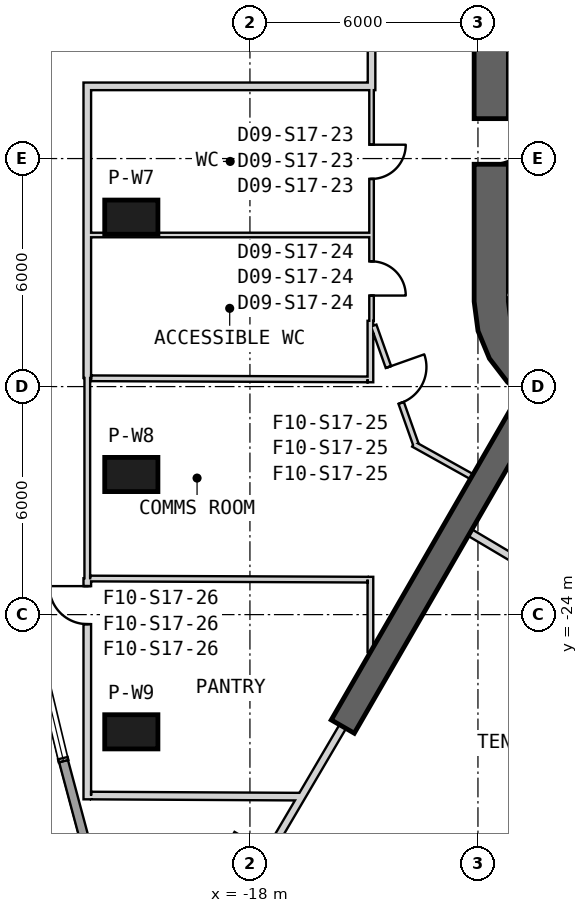
"""IFC4 building model, lengths in metres.
Left out: names, types, materials, properties, quantities, classifications, styles, units other than length and angle.
Written with IfcOpenShell. Run it as: python <this file> out.ifc"""

import sys

from ifc_helpers import new_model, si_unit, direction, frame, frame_2d, origin, origin_2d, place, context, subcontext, project, spatial, polyline, rectangle, outline, extrude, element, fill, save


model = new_model("IFC4")
c1 = context("Model", 3, precision=1e-05, world=origin(), true_north=direction((0.0, 1.0)))
c2 = subcontext(c1, "Body", "Model", "MODEL_VIEW")
j1 = project(units=[si_unit("LENGTHUNIT", "METRE"), si_unit("PLANEANGLEUNIT", "RADIAN")], contexts=[c1])
p1 = place(None, origin())
s1 = spatial("IfcSite", under=j1, at=p1, CompositionType="ELEMENT")
p2 = place(p1, origin())
s2 = spatial("IfcBuilding", under=s1, at=p2, CompositionType="ELEMENT")
p3 = place(p2, frame((0.0, 0.0, 265.2)))
s3 = spatial("IfcBuildingStorey", under=s2, at=p3, CompositionType="ELEMENT", Elevation=265.2)
p4 = place(p3, frame((-18.135, -31.411, 0.0), z_axis=(0.0, 0.0, 1.0), x_axis=(-0.5, -0.866025403784, 0.0)))
e1 = element("IfcColumn", 1, at=p4, inside=s3, PredefinedType="COLUMN", context=c2, shape_type="SweptSolid", body=[
    extrude(rectangle(XDim=2.6, YDim=2.1, at=origin_2d()), origin(), (0.0, 0.0, 1.0), 4.0),
])
for number, where, z_axis, x_axis in (
    (2, (-21.121, -13.542, 0.0), (0.0, 0.0, 1.0), (-1.0, 0.0, 0.0)),
    (3, (-21.121, -20.313, 0.0), (0.0, 0.0, 1.0), (-1.0, 0.0, 0.0)),
    (4, (-21.121, -27.084, 0.0), (0.0, 0.0, 1.0), (-1.0, 0.0, 0.0)),
):
    element("IfcColumn", number, at=place(p3, frame(where, z_axis=z_axis, x_axis=x_axis)), inside=s3, PredefinedType="COLUMN", context=c2, shape_type="SweptSolid", body=[
        extrude(rectangle(XDim=1.4, YDim=0.9, at=origin_2d()), origin(), (0.0, 0.0, 1.0), 4.0),
    ])
p5 = place(p3, frame((-11.65, 15.762, 0.0), z_axis=(0.0, 0.0, 1.0), x_axis=(0.0, -1.0, 0.0)))
e5 = element("IfcWall", 5, at=p5, inside=s3, PredefinedType="SHEAR", context=c2, shape_type="SweptSolid", body=[
    extrude(rectangle(XDim=31.523, YDim=0.9, at=frame_2d((15.762, 0.0))), origin(), (0.0, 0.0, 1.0), 4.0),
])
p6 = place(p5, frame((7.062, 0.0, 0.0)))
e6 = element("IfcOpeningElement", 6, at=p6, cuts=e5, PredefinedType="OPENING", context=c2, shape_type="SweptSolid", body=[
    extrude(rectangle(XDim=1.2, YDim=2.4, at=frame_2d((0.6, 1.2))), frame((0.0, 0.46, 0.0), z_axis=(0.0, -1.0, 0.0), x_axis=(1.0, 0.0, 0.0)), (0.0, 0.0, 1.0), 0.92),
])
p7 = place(p5, frame((9.762, 0.0, 0.0)))
e7 = element("IfcOpeningElement", 7, at=p7, cuts=e5, PredefinedType="OPENING", context=c2, shape_type="SweptSolid", body=[
    extrude(rectangle(XDim=1.2, YDim=2.4, at=frame_2d((0.6, 1.2))), frame((0.0, 0.46, 0.0), z_axis=(0.0, -1.0, 0.0), x_axis=(1.0, 0.0, 0.0)), (0.0, 0.0, 1.0), 0.92),
])
p8 = place(p5, frame((12.462, 0.0, 0.0)))
e8 = element("IfcOpeningElement", 8, at=p8, cuts=e5, PredefinedType="OPENING", context=c2, shape_type="SweptSolid", body=[
    extrude(rectangle(XDim=1.2, YDim=2.4, at=frame_2d((0.6, 1.2))), frame((0.0, 0.46, 0.0), z_axis=(0.0, -1.0, 0.0), x_axis=(1.0, 0.0, 0.0)), (0.0, 0.0, 1.0), 0.92),
])
p9 = place(p5, frame((15.162, 0.0, 0.0)))
e9 = element("IfcOpeningElement", 9, at=p9, cuts=e5, PredefinedType="OPENING", context=c2, shape_type="SweptSolid", body=[
    extrude(rectangle(XDim=1.2, YDim=2.4, at=frame_2d((0.6, 1.2))), frame((0.0, 0.46, 0.0), z_axis=(0.0, -1.0, 0.0), x_axis=(1.0, 0.0, 0.0)), (0.0, 0.0, 1.0), 0.92),
])
p10 = place(p5, frame((17.862, 0.0, 0.0)))
e10 = element("IfcOpeningElement", 10, at=p10, cuts=e5, PredefinedType="OPENING", context=c2, shape_type="SweptSolid", body=[
    extrude(rectangle(XDim=1.2, YDim=2.4, at=frame_2d((0.6, 1.2))), frame((0.0, 0.46, 0.0), z_axis=(0.0, -1.0, 0.0), x_axis=(1.0, 0.0, 0.0)), (0.0, 0.0, 1.0), 0.92),
])
p11 = place(p5, frame((20.562, 0.0, 0.0)))
e11 = element("IfcOpeningElement", 11, at=p11, cuts=e5, PredefinedType="OPENING", context=c2, shape_type="SweptSolid", body=[
    extrude(rectangle(XDim=1.2, YDim=2.4, at=frame_2d((0.6, 1.2))), frame((0.0, 0.46, 0.0), z_axis=(0.0, -1.0, 0.0), x_axis=(1.0, 0.0, 0.0)), (0.0, 0.0, 1.0), 0.92),
])
p12 = place(p5, frame((23.262, 0.0, 0.0)))
e12 = element("IfcOpeningElement", 12, at=p12, cuts=e5, PredefinedType="OPENING", context=c2, shape_type="SweptSolid", body=[
    extrude(rectangle(XDim=1.2, YDim=2.4, at=frame_2d((0.6, 1.2))), frame((0.0, 0.46, 0.0), z_axis=(0.0, -1.0, 0.0), x_axis=(1.0, 0.0, 0.0)), (0.0, 0.0, 1.0), 0.92),
])
p13 = place(p5, frame((3.612, 0.0, 0.0)))
e13 = element("IfcOpeningElement", 13, at=p13, cuts=e5, PredefinedType="OPENING", context=c2, shape_type="SweptSolid", body=[
    extrude(rectangle(XDim=1.2, YDim=2.4, at=frame_2d((0.6, 1.2))), frame((0.0, 0.46, 0.0), z_axis=(0.0, -1.0, 0.0), x_axis=(1.0, 0.0, 0.0)), (0.0, 0.0, 1.0), 0.92),
])
p14 = place(p5, frame((26.712, 0.0, 0.0)))
e14 = element("IfcOpeningElement", 14, at=p14, cuts=e5, PredefinedType="OPENING", context=c2, shape_type="SweptSolid", body=[
    extrude(rectangle(XDim=1.2, YDim=2.4, at=frame_2d((0.6, 1.2))), frame((0.0, 0.46, 0.0), z_axis=(0.0, -1.0, 0.0), x_axis=(1.0, 0.0, 0.0)), (0.0, 0.0, 1.0), 0.92),
])
p15 = place(p3, origin())
e15 = element("IfcWall", 15, at=p15, inside=s3, PredefinedType="SHEAR", context=c2, shape_type="SweptSolid", body=[
    extrude(outline(polyline([(-12.1, -15.762), (-11.998, -16.538), (-11.698, -17.262), (-11.221, -17.883), (-10.6, -18.36), (-9.876, -18.659), (-9.1, -18.762), (-8.323, -18.659), (-7.6, -18.36), (-8.05, -17.58), (-8.556, -17.79), (-9.1, -17.862), (-9.644, -17.79), (-10.15, -17.58), (-10.585, -17.247), (-10.919, -16.812), (-11.128, -16.305), (-11.2, -15.762), (-12.1, -15.762)])), origin(), (0.0, 0.0, 1.0), 4.0),
])
p16 = place(p3, frame((-10.575, -18.316, 0.0), z_axis=(0.0, 0.0, 1.0), x_axis=(-0.500007350791, -0.866021159762, 0.0)))
e16 = element("IfcWall", 16, at=p16, inside=s3, PredefinedType="SHEAR", context=c2, shape_type="SweptSolid", body=[
    extrude(rectangle(XDim=9.965, YDim=0.7, at=frame_2d((4.982, 0.0))), origin(), (0.0, 0.0, 1.0), 4.0),
])
p17 = place(p3, frame((-22.905, -27.854, 0.0), z_axis=(0.0, 0.0, 1.0), x_axis=(0.258814010312, -0.965927175343, 0.0)))
e17 = element("IfcWall", 17, at=p17, inside=s3, PredefinedType="SOLIDWALL", context=c2, shape_type="SweptSolid", body=[
    extrude(rectangle(XDim=3.55, YDim=0.24, at=frame_2d((1.775, 0.0))), origin(), (0.0, 0.0, 1.0), 3.7),
])
p18 = place(p3, frame((-11.282, -15.541, -0.3), z_axis=(0.0, 0.0, 1.0), x_axis=(0.866000483506, -0.500043160704, 0.0)))
e18 = element("IfcWall", 18, at=p18, inside=s3, PredefinedType="SHEAR", context=c2, shape_type="SweptSolid", body=[
    extrude(rectangle(XDim=3.8, YDim=0.2, at=frame_2d((1.9, 0.0))), origin(), (0.0, 0.0, 1.0), 4.0),
])
p19 = place(p3, frame((-7.196, -8.663, -0.3), z_axis=(0.0, 0.0, 1.0), x_axis=(-0.499997992926, -0.866026562566, 0.0)))
e19 = element("IfcWall", 19, at=p19, inside=s3, PredefinedType="SHEAR", context=c2, shape_type="SweptSolid", body=[
    extrude(rectangle(XDim=7.9, YDim=0.2, at=frame_2d((3.95, 0.0))), origin(), (0.0, 0.0, 1.0), 4.0),
])
p20 = place(p3, frame((-14.8, -10.13, 0.0), z_axis=(0.0, 0.0, 1.0), x_axis=(0.0, -1.0, 0.0)))
e20 = element("IfcWall", 20, at=p20, inside=s3, PredefinedType="PARTITIONING", context=c2, shape_type="SweptSolid", body=[
    extrude(rectangle(XDim=6.138, YDim=0.12, at=frame_2d((3.069, 0.0))), origin(), (0.0, 0.0, 1.0), 2.98),
])
p21 = place(p20, frame((1.506, 0.0, 0.0)))
e21 = element("IfcOpeningElement", 21, at=p21, cuts=e20, PredefinedType="OPENING", context=c2, shape_type="SweptSolid", body=[
    extrude(rectangle(XDim=0.9, YDim=2.1, at=frame_2d((0.45, 1.05))), frame((0.0, 0.07, 0.0), z_axis=(0.0, -1.0, 0.0), x_axis=(1.0, 0.0, 0.0)), (0.0, 0.0, 1.0), 0.14),
])
p22 = place(p20, frame((4.575, 0.0, 0.0)))
e22 = element("IfcOpeningElement", 22, at=p22, cuts=e20, PredefinedType="OPENING", context=c2, shape_type="SweptSolid", body=[
    extrude(rectangle(XDim=0.9, YDim=2.1, at=frame_2d((0.45, 1.05))), frame((0.0, 0.07, 0.0), z_axis=(0.0, -1.0, 0.0), x_axis=(1.0, 0.0, 0.0)), (0.0, 0.0, 1.0), 0.14),
])
p23 = place(p3, frame((-14.8, -0.07, 0.0), z_axis=(0.0, 0.0, 1.0), x_axis=(0.0, -1.0, 0.0)))
e23 = element("IfcWall", 23, at=p23, inside=s3, PredefinedType="PARTITIONING", context=c2, shape_type="SweptSolid", body=[
    extrude(rectangle(XDim=10.13, YDim=0.2, at=frame_2d((5.065, 0.0))), origin(), (0.0, 0.0, 1.0), 3.07),
])
p24 = place(p3, frame((-13.696, -19.514, 0.0), z_axis=(0.0, 0.0, 1.0), x_axis=(0.873335409284, -0.487119351792, 0.0)))
e24 = element("IfcWall", 24, at=p24, inside=s3, PredefinedType="PLUMBINGWALL", context=c2, shape_type="SweptSolid", body=[
    extrude(rectangle(XDim=1.754, YDim=0.15, at=frame_2d((0.877, 0.0))), origin(), (0.0, 0.0, 1.0), 3.7),
])
p25 = place(p3, frame((-14.743, -16.394, 0.0), z_axis=(0.0, 0.0, 1.0), x_axis=(0.334298080075, -0.942467396602, 0.0)))
e25 = element("IfcWall", 25, at=p25, inside=s3, PredefinedType="PLUMBINGWALL", context=c2, shape_type="SweptSolid", body=[
    extrude(rectangle(XDim=3.317, YDim=0.15, at=frame_2d((1.659, 0.0))), origin(), (0.0, 0.0, 1.0), 2.88),
])
p26 = place(p25, frame((1.158, 0.0, 0.0)))
e26 = element("IfcOpeningElement", 26, at=p26, cuts=e25, PredefinedType="OPENING", context=c2, shape_type="SweptSolid", body=[
    extrude(rectangle(XDim=1.0, YDim=2.1, at=frame_2d((0.5, 1.05))), frame((0.0, 0.085, 0.0), z_axis=(0.0, -1.0, 0.0), x_axis=(1.0, 0.0, 0.0)), (0.0, 0.0, 1.0), 0.17),
])
p27 = place(p3, frame((-12.207, -21.843, 0.0), z_axis=(0.0, 0.0, 1.0), x_axis=(0.859912345357, -0.510441728606, 0.0)))
e27 = element("IfcWall", 27, at=p27, inside=s3, PredefinedType="PARTITIONING", context=c2, shape_type="SweptSolid", body=[
    extrude(rectangle(XDim=2.093, YDim=0.2, at=frame_2d((1.046, 0.0))), origin(), (0.0, 0.0, 1.0), 3.7),
])
p28 = place(p3, frame((-15.557, -26.946, 0.0), z_axis=(0.0, 0.0, 1.0), x_axis=(-0.506699088554, -0.862122980588, 0.0)))
e28 = element("IfcWall", 28, at=p28, inside=s3, PredefinedType="PARTITIONING", context=c2, shape_type="SweptSolid", body=[
    extrude(rectangle(XDim=3.855, YDim=0.2, at=frame_2d((1.928, 0.0))), origin(), (0.0, 0.0, 1.0), 3.27),
])
p29 = place(p3, frame((-14.9, -10.1, 0.0), z_axis=(0.0, 0.0, 1.0), x_axis=(-1.0, 0.0, 0.0)))
e29 = element("IfcWall", 29, at=p29, inside=s3, PredefinedType="PARTITIONING", context=c2, shape_type="SweptSolid", body=[
    extrude(rectangle(XDim=7.48, YDim=0.2, at=frame_2d((3.74, 0.0))), origin(), (0.0, 0.0, 1.0), 3.07),
])
p30 = place(p3, frame((-22.28, -28.86, 0.0), z_axis=(0.0, 0.0, 1.0), x_axis=(0.0, 1.0, 0.0)))
e30 = element("IfcWall", 30, at=p30, inside=s3, PredefinedType="PARTITIONING", context=c2, shape_type="SweptSolid", body=[
    extrude(rectangle(XDim=5.817, YDim=0.2, at=frame_2d((2.909, 0.0))), origin(), (0.0, 0.0, 1.0), 3.7),
])
p31 = place(p30, frame((4.61, 0.0, 0.0)))
e31 = element("IfcOpeningElement", 31, at=p31, cuts=e30, PredefinedType="OPENING", context=c2, shape_type="SweptSolid", body=[
    extrude(rectangle(XDim=1.0, YDim=2.1, at=frame_2d((0.5, 1.05))), frame((0.0, 0.11, 0.0), z_axis=(0.0, -1.0, 0.0), x_axis=(1.0, 0.0, 0.0)), (0.0, 0.0, 1.0), 0.22),
])
p32 = place(p3, frame((-22.28, -17.774, 0.0), z_axis=(0.0, 0.0, 1.0), x_axis=(0.0, 1.0, 0.0)))
e32 = element("IfcWall", 32, at=p32, inside=s3, PredefinedType="PARTITIONING", context=c2, shape_type="SweptSolid", body=[
    extrude(rectangle(XDim=7.574, YDim=0.2, at=frame_2d((3.787, 0.0))), origin(), (0.0, 0.0, 1.0), 3.7),
])
p33 = place(p3, frame((-22.28, -23.043, 0.0), z_axis=(0.0, 0.0, 1.0), x_axis=(0.0, 1.0, 0.0)))
e33 = element("IfcWall", 33, at=p33, inside=s3, PredefinedType="PLUMBINGWALL", context=c2, shape_type="SweptSolid", body=[
    extrude(rectangle(XDim=5.269, YDim=0.15, at=frame_2d((2.634, 0.0))), origin(), (0.0, 0.0, 1.0), 3.7),
])
p34 = place(p3, frame((-22.18, -28.76, 0.0), z_axis=(0.0, 0.0, 1.0), x_axis=(0.999985875988, -0.005314868268, 0.0)))
e34 = element("IfcWall", 34, at=p34, inside=s3, PredefinedType="PARTITIONING", context=c2, shape_type="SweptSolid", body=[
    extrude(rectangle(XDim=5.558, YDim=0.2, at=frame_2d((2.779, 0.0))), origin(), (0.0, 0.0, 1.0), 3.27),
])
p35 = place(p3, frame((-22.18, -14.011, 0.0), z_axis=(0.0, 0.0, 1.0), x_axis=(1.0, 0.0, 0.0)))
e35 = element("IfcWall", 35, at=p35, inside=s3, PredefinedType="PARTITIONING", context=c2, shape_type="SweptSolid", body=[
    extrude(rectangle(XDim=7.35, YDim=0.12, at=frame_2d((3.675, 0.0))), origin(), (0.0, 0.0, 1.0), 3.7),
])
p36 = place(p3, frame((-14.83, -24.986, 0.0), z_axis=(0.0, 0.0, 1.0), x_axis=(0.0, 1.0, 0.0)))
e36 = element("IfcWall", 36, at=p36, inside=s3, PredefinedType="PLUMBINGWALL", context=c2, shape_type="SweptSolid", body=[
    extrude(rectangle(XDim=1.981, YDim=0.15, at=frame_2d((0.991, 0.0))), origin(), (0.0, 0.0, 1.0), 3.7),
])
p37 = place(p3, frame((-14.83, -17.886, 0.0), z_axis=(0.0, 0.0, 1.0), x_axis=(0.0, 1.0, 0.0)))
e37 = element("IfcWall", 37, at=p37, inside=s3, PredefinedType="PLUMBINGWALL", context=c2, shape_type="SweptSolid", body=[
    extrude(rectangle(XDim=1.618, YDim=0.15, at=frame_2d((0.809, 0.0))), origin(), (0.0, 0.0, 1.0), 3.7),
])
p38 = place(p3, frame((-14.905, -17.811, 0.0), z_axis=(0.0, 0.0, 1.0), x_axis=(-0.999991891267, 0.004027083259, 0.0)))
e38 = element("IfcWall", 38, at=p38, inside=s3, PredefinedType="PLUMBINGWALL", context=c2, shape_type="SweptSolid", body=[
    extrude(rectangle(XDim=7.275, YDim=0.15, at=frame_2d((3.637, 0.0))), origin(), (0.0, 0.0, 1.0), 2.98),
])
p39 = place(p3, frame((-22.205, -23.051, 0.0), z_axis=(0.0, 0.0, 1.0), x_axis=(0.999991947035, -0.004013211386, 0.0)))
e39 = element("IfcWall", 39, at=p39, inside=s3, PredefinedType="PLUMBINGWALL", context=c2, shape_type="SweptSolid", body=[
    extrude(rectangle(XDim=7.3, YDim=0.15, at=frame_2d((3.65, 0.0))), origin(), (0.0, 0.0, 1.0), 2.88),
])
p40 = place(p21, origin())
e40 = element("IfcDoor", 40, at=p40, inside=s3, OperationType="SINGLE_SWING_RIGHT", PredefinedType="NOTDEFINED", context=c2, shape_type="SweptSolid", body=[
    extrude(rectangle(XDim=0.9, YDim=2.1, at=frame_2d((0.45, 1.05))), frame((0.0, 0.025, 0.0), z_axis=(0.0, -1.0, 0.0), x_axis=(1.0, 0.0, 0.0)), (0.0, 0.0, 1.0), 0.05),
])
fill(e21, e40)
p41 = place(p22, origin())
e41 = element("IfcDoor", 41, at=p41, inside=s3, OperationType="SINGLE_SWING_RIGHT", PredefinedType="NOTDEFINED", context=c2, shape_type="SweptSolid", body=[
    extrude(rectangle(XDim=0.9, YDim=2.1, at=frame_2d((0.45, 1.05))), frame((0.0, 0.025, 0.0), z_axis=(0.0, -1.0, 0.0), x_axis=(1.0, 0.0, 0.0)), (0.0, 0.0, 1.0), 0.05),
])
fill(e22, e41)
p42 = place(p26, origin())
e42 = element("IfcDoor", 42, at=p42, inside=s3, OperationType="SINGLE_SWING_LEFT", PredefinedType="USERDEFINED", context=c2, shape_type="SweptSolid", body=[
    extrude(rectangle(XDim=1.0, YDim=2.1, at=frame_2d((0.5, 1.05))), frame((0.0, 0.025, 0.0), z_axis=(0.0, -1.0, 0.0), x_axis=(1.0, 0.0, 0.0)), (0.0, 0.0, 1.0), 0.05),
])
fill(e26, e42)
p43 = place(p31, origin())
e43 = element("IfcDoor", 43, at=p43, inside=s3, OperationType="SINGLE_SWING_RIGHT", PredefinedType="USERDEFINED", context=c2, shape_type="SweptSolid", body=[
    extrude(rectangle(XDim=1.0, YDim=2.1, at=frame_2d((0.5, 1.05))), frame((0.0, 0.025, 0.0), z_axis=(0.0, -1.0, 0.0), x_axis=(1.0, 0.0, 0.0)), (0.0, 0.0, 1.0), 0.05),
])
fill(e31, e43)
p44 = place(p14, origin())
e44 = element("IfcDoor", 44, at=p44, inside=s3, OperationType="SINGLE_SWING_RIGHT", PredefinedType="USERDEFINED", context=c2, shape_type="SweptSolid", body=[
    extrude(rectangle(XDim=1.2, YDim=2.4, at=frame_2d((0.6, 1.2))), frame((0.0, 0.025, 0.0), z_axis=(0.0, -1.0, 0.0), x_axis=(1.0, 0.0, 0.0)), (0.0, 0.0, 1.0), 0.05),
])
fill(e14, e44)
save(model, sys.argv[1])
